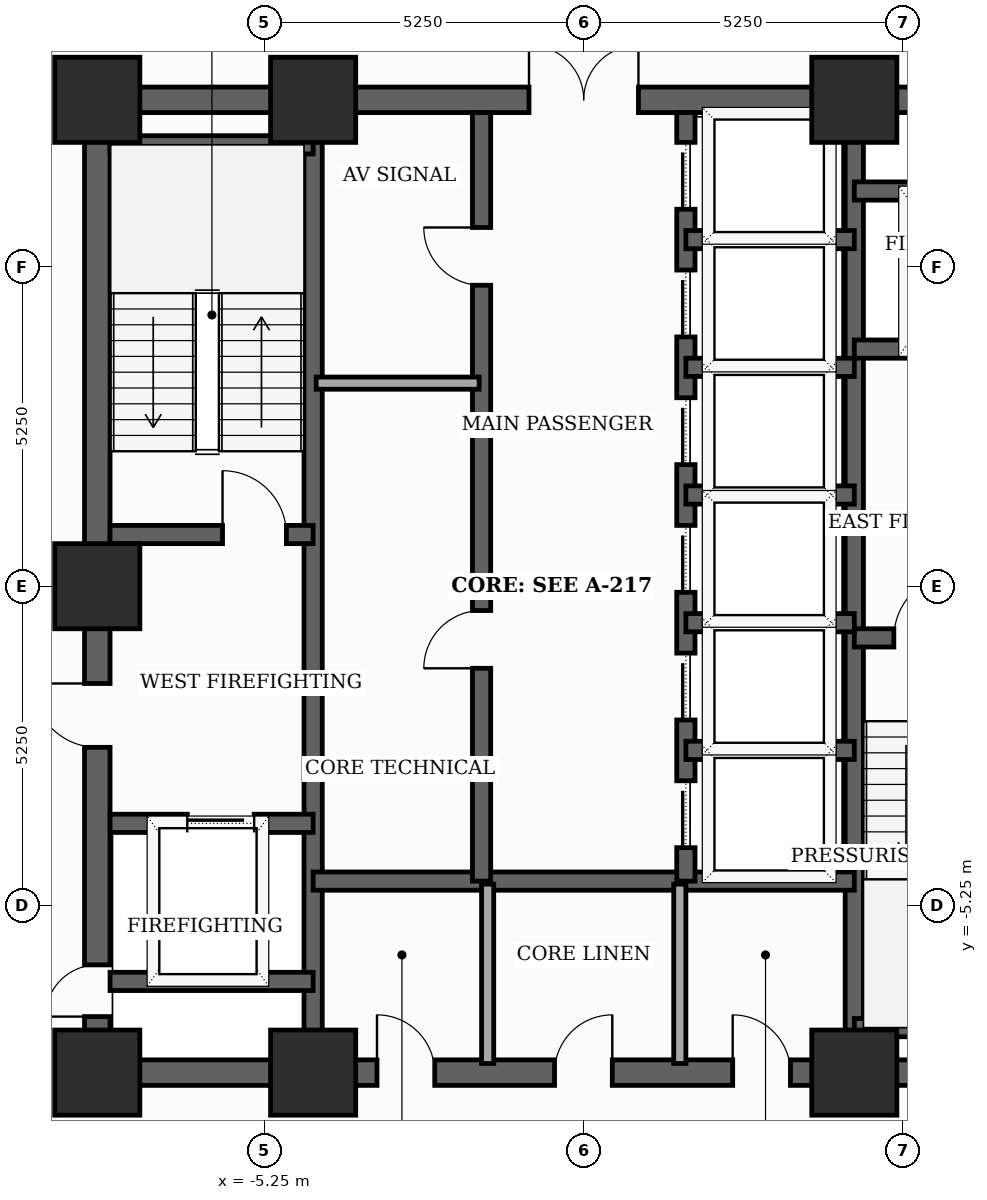
"""IFC4 building model, lengths in metres.
Left out: names, types, materials, properties, quantities, classifications, styles, units other than length and angle.
Written with IfcOpenShell. Run it as: python <this file> out.ifc"""

import sys

from ifc_helpers import new_model, si_unit, direction, frame, frame_2d, origin, origin_2d, place, context, subcontext, project, spatial, rectangle, extrude, element, fill, save


model = new_model("IFC4")
c1 = context("Model", 3, precision=1e-05, world=origin(), true_north=direction((0.0, 1.0)))
c2 = subcontext(c1, "Body", "Model", "MODEL_VIEW")
j1 = project(units=[si_unit("LENGTHUNIT", "METRE"), si_unit("PLANEANGLEUNIT", "RADIAN")], contexts=[c1])
p1 = place(None, origin())
s1 = spatial("IfcSite", under=j1, at=p1, CompositionType="ELEMENT")
p2 = place(p1, origin())
s2 = spatial("IfcBuilding", under=s1, at=p2, CompositionType="ELEMENT")
p3 = place(p2, frame((0.0, 0.0, 134.7)))
s3 = spatial("IfcBuildingStorey", under=s2, at=p3, CompositionType="ELEMENT", Elevation=134.7)
for number, where, z_axis, x_axis in (
    (1, (-8.0, -8.0, 0.0), (0.0, 0.0, 1.0), (1.0, 0.0, 0.0)),
    (2, (-4.45, -8.0, 0.0), (0.0, 0.0, 1.0), (1.0, 0.0, 0.0)),
    (3, (4.45, -8.0, 0.0), (0.0, 0.0, 1.0), (1.0, 0.0, 0.0)),
    (4, (4.45, 8.0, 0.0), (0.0, 0.0, 1.0), (1.0, 0.0, 0.0)),
    (5, (-4.45, 8.0, 0.0), (0.0, 0.0, 1.0), (1.0, 0.0, 0.0)),
    (6, (-8.0, 8.0, 0.0), (0.0, 0.0, 1.0), (1.0, 0.0, 0.0)),
    (7, (-8.0, 0.0, 0.0), (0.0, 0.0, 1.0), (1.0, 0.0, 0.0)),
):
    element("IfcColumn", number, at=place(p3, frame(where, z_axis=z_axis, x_axis=x_axis)), inside=s3, PredefinedType="COLUMN", context=c2, shape_type="SweptSolid", body=[
        extrude(rectangle(XDim=1.4, YDim=1.4, at=origin_2d()), origin(), (0.0, 0.0, 1.0), 3.7),
    ])
p4 = place(p3, frame((-8.0, -8.0, 0.0), z_axis=(0.0, 0.0, 1.0), x_axis=(0.0, 1.0, 0.0)))
e8 = element("IfcWall", 8, at=p4, inside=s3, PredefinedType="SHEAR", context=c2, shape_type="SweptSolid", body=[
    extrude(rectangle(XDim=16.0, YDim=0.42, at=frame_2d((8.0, 0.0))), origin(), (0.0, 0.0, 1.0), 3.5),
])
p5 = place(p4, frame((0.922, 0.0, 0.0)))
e9 = element("IfcOpeningElement", 9, at=p5, cuts=e8, PredefinedType="OPENING", context=c2, shape_type="SweptSolid", body=[
    extrude(rectangle(XDim=0.85, YDim=2.02, at=frame_2d((0.425, 1.01))), frame((0.0, 0.22, 0.0), z_axis=(0.0, -1.0, 0.0), x_axis=(1.0, 0.0, 0.0)), (0.0, 0.0, 1.0), 0.44),
])
p6 = place(p4, frame((5.35, 0.0, 0.0)))
e10 = element("IfcOpeningElement", 10, at=p6, cuts=e8, PredefinedType="OPENING", context=c2, shape_type="SweptSolid", body=[
    extrude(rectangle(XDim=1.05, YDim=2.15, at=frame_2d((0.525, 1.075))), frame((0.0, 0.22, 0.0), z_axis=(0.0, -1.0, 0.0), x_axis=(1.0, 0.0, 0.0)), (0.0, 0.0, 1.0), 0.44),
])
p7 = place(p3, frame((-8.0, -8.0, 0.0), z_axis=(0.0, 0.0, 1.0), x_axis=(1.0, 0.0, 0.0)))
e11 = element("IfcWall", 11, at=p7, inside=s3, PredefinedType="SHEAR", context=c2, shape_type="SweptSolid", body=[
    extrude(rectangle(XDim=16.0, YDim=0.42, at=frame_2d((8.0, 0.0))), origin(), (0.0, 0.0, 1.0), 3.5),
])
p8 = place(p7, frame((4.6, 0.0, 0.0)))
e12 = element("IfcOpeningElement", 12, at=p8, cuts=e11, PredefinedType="OPENING", context=c2, shape_type="SweptSolid", body=[
    extrude(rectangle(XDim=0.95, YDim=2.1, at=frame_2d((0.475, 1.05))), frame((0.0, 0.22, 0.0), z_axis=(0.0, -1.0, 0.0), x_axis=(1.0, 0.0, 0.0)), (0.0, 0.0, 1.0), 0.44),
])
p9 = place(p7, frame((7.52, 0.0, 0.0)))
e13 = element("IfcOpeningElement", 13, at=p9, cuts=e11, PredefinedType="OPENING", context=c2, shape_type="SweptSolid", body=[
    extrude(rectangle(XDim=0.95, YDim=2.1, at=frame_2d((0.475, 1.05))), frame((0.0, 0.22, 0.0), z_axis=(0.0, -1.0, 0.0), x_axis=(1.0, 0.0, 0.0)), (0.0, 0.0, 1.0), 0.44),
])
p10 = place(p7, frame((10.45, 0.0, 0.0)))
e14 = element("IfcOpeningElement", 14, at=p10, cuts=e11, PredefinedType="OPENING", context=c2, shape_type="SweptSolid", body=[
    extrude(rectangle(XDim=0.95, YDim=2.1, at=frame_2d((0.475, 1.05))), frame((0.0, 0.22, 0.0), z_axis=(0.0, -1.0, 0.0), x_axis=(1.0, 0.0, 0.0)), (0.0, 0.0, 1.0), 0.44),
])
p11 = place(p3, frame((-8.0, 8.0, 0.0), z_axis=(0.0, 0.0, 1.0), x_axis=(1.0, 0.0, 0.0)))
e15 = element("IfcWall", 15, at=p11, inside=s3, PredefinedType="SHEAR", context=c2, shape_type="SweptSolid", body=[
    extrude(rectangle(XDim=16.0, YDim=0.42, at=frame_2d((8.0, 0.0))), origin(), (0.0, 0.0, 1.0), 3.5),
])
p12 = place(p11, frame((7.1, 0.0, 0.0)))
e16 = element("IfcOpeningElement", 16, at=p12, cuts=e15, PredefinedType="OPENING", context=c2, shape_type="SweptSolid", body=[
    extrude(rectangle(XDim=1.8, YDim=2.15, at=frame_2d((0.9, 1.075))), frame((0.0, 0.22, 0.0), z_axis=(0.0, -1.0, 0.0), x_axis=(1.0, 0.0, 0.0)), (0.0, 0.0, 1.0), 0.44),
])
for number, where, z_axis, x_axis in (
    (17, (-4.45, -7.79, 0.0), (0.0, 0.0, 1.0), (0.0, 1.0, 0.0)),
    (18, (4.45, -7.79, 0.0), (0.0, 0.0, 1.0), (0.0, 1.0, 0.0)),
):
    element("IfcWall", number, at=place(p3, frame(where, z_axis=z_axis, x_axis=x_axis)), inside=s3, PredefinedType="SHEAR", context=c2, shape_type="SweptSolid", body=[
        extrude(rectangle(XDim=15.58, YDim=0.3, at=frame_2d((7.79, 0.0))), origin(), (0.0, 0.0, 1.0), 3.5),
    ])
p13 = place(p3, frame((-7.79, 0.85, 0.0), z_axis=(0.0, 0.0, 1.0), x_axis=(1.0, 0.0, 0.0)))
e19 = element("IfcWall", 19, at=p13, inside=s3, PredefinedType="SHEAR", context=c2, shape_type="SweptSolid", body=[
    extrude(rectangle(XDim=3.34, YDim=0.3, at=frame_2d((1.67, 0.0))), origin(), (0.0, 0.0, 1.0), 3.5),
])
p14 = place(p13, frame((1.85, 0.0, 0.0)))
e20 = element("IfcOpeningElement", 20, at=p14, cuts=e19, PredefinedType="OPENING", context=c2, shape_type="SweptSolid", body=[
    extrude(rectangle(XDim=1.05, YDim=2.15, at=frame_2d((0.525, 1.075))), frame((0.0, 0.16, 0.0), z_axis=(0.0, -1.0, 0.0), x_axis=(1.0, 0.0, 0.0)), (0.0, 0.0, 1.0), 0.32),
])
p15 = place(p3, frame((-7.79, 7.26, 0.0), z_axis=(0.0, 0.0, 1.0), x_axis=(1.0, 0.0, 0.0)))
e21 = element("IfcWall", 21, at=p15, inside=s3, PredefinedType="SHEAR", context=c2, shape_type="SweptSolid", body=[
    extrude(rectangle(XDim=3.34, YDim=0.3, at=frame_2d((1.67, 0.0))), origin(), (0.0, 0.0, 1.0), 3.5),
])
p16 = place(p3, frame((4.45, -0.85, 0.0), z_axis=(0.0, 0.0, 1.0), x_axis=(1.0, 0.0, 0.0)))
e22 = element("IfcWall", 22, at=p16, inside=s3, PredefinedType="SHEAR", context=c2, shape_type="SweptSolid", body=[
    extrude(rectangle(XDim=3.34, YDim=0.3, at=frame_2d((1.67, 0.0))), origin(), (0.0, 0.0, 1.0), 3.5),
])
p17 = place(p16, frame((0.65, 0.0, 0.0)))
e23 = element("IfcOpeningElement", 23, at=p17, cuts=e22, PredefinedType="OPENING", context=c2, shape_type="SweptSolid", body=[
    extrude(rectangle(XDim=1.05, YDim=2.15, at=frame_2d((0.525, 1.075))), frame((0.0, 0.16, 0.0), z_axis=(0.0, -1.0, 0.0), x_axis=(1.0, 0.0, 0.0)), (0.0, 0.0, 1.0), 0.32),
])
p18 = place(p3, frame((4.45, -7.26, 0.0), z_axis=(0.0, 0.0, 1.0), x_axis=(1.0, 0.0, 0.0)))
e24 = element("IfcWall", 24, at=p18, inside=s3, PredefinedType="SHEAR", context=c2, shape_type="SweptSolid", body=[
    extrude(rectangle(XDim=3.55, YDim=0.3, at=frame_2d((1.775, 0.0))), origin(), (0.0, 0.0, 1.0), 3.5),
])
p19 = place(p3, frame((-7.79, -3.9, 0.0), z_axis=(0.0, 0.0, 1.0), x_axis=(1.0, 0.0, 0.0)))
e25 = element("IfcWall", 25, at=p19, inside=s3, PredefinedType="SHEAR", context=c2, shape_type="SweptSolid", body=[
    extrude(rectangle(XDim=3.34, YDim=0.3, at=frame_2d((1.67, 0.0))), origin(), (0.0, 0.0, 1.0), 3.5),
])
p20 = place(p19, frame((1.27, 0.0, 0.0)))
e26 = element("IfcOpeningElement", 26, at=p20, cuts=e25, PredefinedType="OPENING", context=c2, shape_type="SweptSolid", body=[
    extrude(rectangle(XDim=1.1, YDim=2.1, at=frame_2d((0.55, 1.05))), frame((0.0, 0.16, 0.0), z_axis=(0.0, -1.0, 0.0), x_axis=(1.0, 0.0, 0.0)), (0.0, 0.0, 1.0), 0.32),
])
p21 = place(p3, frame((-7.79, -6.5, 0.0), z_axis=(0.0, 0.0, 1.0), x_axis=(1.0, 0.0, 0.0)))
e27 = element("IfcWall", 27, at=p21, inside=s3, PredefinedType="SHEAR", context=c2, shape_type="SweptSolid", body=[
    extrude(rectangle(XDim=3.34, YDim=0.3, at=frame_2d((1.67, 0.0))), origin(), (0.0, 0.0, 1.0), 3.5),
])
p22 = place(p3, frame((4.45, 3.9, 0.0), z_axis=(0.0, 0.0, 1.0), x_axis=(1.0, 0.0, 0.0)))
e28 = element("IfcWall", 28, at=p22, inside=s3, PredefinedType="SHEAR", context=c2, shape_type="SweptSolid", body=[
    extrude(rectangle(XDim=3.34, YDim=0.3, at=frame_2d((1.67, 0.0))), origin(), (0.0, 0.0, 1.0), 3.5),
])
p23 = place(p22, frame((1.18, 0.0, 0.0)))
e29 = element("IfcOpeningElement", 29, at=p23, cuts=e28, PredefinedType="OPENING", context=c2, shape_type="SweptSolid", body=[
    extrude(rectangle(XDim=1.1, YDim=2.1, at=frame_2d((0.55, 1.05))), frame((0.0, 0.16, 0.0), z_axis=(0.0, -1.0, 0.0), x_axis=(1.0, 0.0, 0.0)), (0.0, 0.0, 1.0), 0.32),
])
p24 = place(p3, frame((4.45, 6.5, 0.0), z_axis=(0.0, 0.0, 1.0), x_axis=(1.0, 0.0, 0.0)))
e30 = element("IfcWall", 30, at=p24, inside=s3, PredefinedType="SHEAR", context=c2, shape_type="SweptSolid", body=[
    extrude(rectangle(XDim=3.34, YDim=0.3, at=frame_2d((1.67, 0.0))), origin(), (0.0, 0.0, 1.0), 3.5),
])
p25 = place(p3, frame((-4.45, -4.85, 0.0), z_axis=(0.0, 0.0, 1.0), x_axis=(1.0, 0.0, 0.0)))
e31 = element("IfcWall", 31, at=p25, inside=s3, PredefinedType="SHEAR", context=c2, shape_type="SweptSolid", body=[
    extrude(rectangle(XDim=8.9, YDim=0.3, at=frame_2d((4.45, 0.0))), origin(), (0.0, 0.0, 1.0), 3.5),
])
p26 = place(p3, frame((-1.68, -4.85, 0.0), z_axis=(0.0, 0.0, 1.0), x_axis=(0.0, 1.0, 0.0)))
e32 = element("IfcWall", 32, at=p26, inside=s3, PredefinedType="SHEAR", context=c2, shape_type="SweptSolid", body=[
    extrude(rectangle(XDim=12.64, YDim=0.3, at=frame_2d((6.32, 0.0))), origin(), (0.0, 0.0, 1.0), 3.5),
])
p27 = place(p26, frame((3.5, 0.0, 0.0)))
e33 = element("IfcOpeningElement", 33, at=p27, cuts=e32, PredefinedType="OPENING", context=c2, shape_type="SweptSolid", body=[
    extrude(rectangle(XDim=0.95, YDim=2.1, at=frame_2d((0.475, 1.05))), frame((0.0, 0.16, 0.0), z_axis=(0.0, -1.0, 0.0), x_axis=(1.0, 0.0, 0.0)), (0.0, 0.0, 1.0), 0.32),
])
p28 = place(p26, frame((9.8, 0.0, 0.0)))
e34 = element("IfcOpeningElement", 34, at=p28, cuts=e32, PredefinedType="OPENING", context=c2, shape_type="SweptSolid", body=[
    extrude(rectangle(XDim=0.95, YDim=2.1, at=frame_2d((0.475, 1.05))), frame((0.0, 0.16, 0.0), z_axis=(0.0, -1.0, 0.0), x_axis=(1.0, 0.0, 0.0)), (0.0, 0.0, 1.0), 0.32),
])
p29 = place(p3, frame((1.68, -4.85, 0.0), z_axis=(0.0, 0.0, 1.0), x_axis=(0.0, 1.0, 0.0)))
e35 = element("IfcWall", 35, at=p29, inside=s3, PredefinedType="SHEAR", context=c2, shape_type="SweptSolid", body=[
    extrude(rectangle(XDim=12.64, YDim=0.3, at=frame_2d((6.32, 0.0))), origin(), (0.0, 0.0, 1.0), 3.5),
])
p30 = place(p29, frame((0.55, 0.0, 0.0)))
e36 = element("IfcOpeningElement", 36, at=p30, cuts=e35, PredefinedType="OPENING", context=c2, shape_type="SweptSolid", body=[
    extrude(rectangle(XDim=1.1, YDim=2.1, at=frame_2d((0.55, 1.05))), frame((0.0, 0.16, 0.0), z_axis=(0.0, -1.0, 0.0), x_axis=(1.0, 0.0, 0.0)), (0.0, 0.0, 1.0), 0.32),
])
p31 = place(p29, frame((2.65, 0.0, 0.0)))
e37 = element("IfcOpeningElement", 37, at=p31, cuts=e35, PredefinedType="OPENING", context=c2, shape_type="SweptSolid", body=[
    extrude(rectangle(XDim=1.1, YDim=2.1, at=frame_2d((0.55, 1.05))), frame((0.0, 0.16, 0.0), z_axis=(0.0, -1.0, 0.0), x_axis=(1.0, 0.0, 0.0)), (0.0, 0.0, 1.0), 0.32),
])
p32 = place(p29, frame((4.75, 0.0, 0.0)))
e38 = element("IfcOpeningElement", 38, at=p32, cuts=e35, PredefinedType="OPENING", context=c2, shape_type="SweptSolid", body=[
    extrude(rectangle(XDim=1.1, YDim=2.1, at=frame_2d((0.55, 1.05))), frame((0.0, 0.16, 0.0), z_axis=(0.0, -1.0, 0.0), x_axis=(1.0, 0.0, 0.0)), (0.0, 0.0, 1.0), 0.32),
])
p33 = place(p29, frame((6.85, 0.0, 0.0)))
e39 = element("IfcOpeningElement", 39, at=p33, cuts=e35, PredefinedType="OPENING", context=c2, shape_type="SweptSolid", body=[
    extrude(rectangle(XDim=1.1, YDim=2.1, at=frame_2d((0.55, 1.05))), frame((0.0, 0.16, 0.0), z_axis=(0.0, -1.0, 0.0), x_axis=(1.0, 0.0, 0.0)), (0.0, 0.0, 1.0), 0.32),
])
p34 = place(p29, frame((8.95, 0.0, 0.0)))
e40 = element("IfcOpeningElement", 40, at=p34, cuts=e35, PredefinedType="OPENING", context=c2, shape_type="SweptSolid", body=[
    extrude(rectangle(XDim=1.1, YDim=2.1, at=frame_2d((0.55, 1.05))), frame((0.0, 0.16, 0.0), z_axis=(0.0, -1.0, 0.0), x_axis=(1.0, 0.0, 0.0)), (0.0, 0.0, 1.0), 0.32),
])
p35 = place(p29, frame((11.05, 0.0, 0.0)))
e41 = element("IfcOpeningElement", 41, at=p35, cuts=e35, PredefinedType="OPENING", context=c2, shape_type="SweptSolid", body=[
    extrude(rectangle(XDim=1.1, YDim=2.1, at=frame_2d((0.55, 1.05))), frame((0.0, 0.16, 0.0), z_axis=(0.0, -1.0, 0.0), x_axis=(1.0, 0.0, 0.0)), (0.0, 0.0, 1.0), 0.32),
])
for number, where, z_axis, x_axis in (
    (42, (1.68, 1.5, 0.0), (0.0, 0.0, 1.0), (1.0, 0.0, 0.0)),
    (43, (1.68, 3.6, 0.0), (0.0, 0.0, 1.0), (1.0, 0.0, 0.0)),
    (44, (1.68, 5.7, 0.0), (0.0, 0.0, 1.0), (1.0, 0.0, 0.0)),
    (45, (1.68, -2.7, 0.0), (0.0, 0.0, 1.0), (1.0, 0.0, 0.0)),
    (46, (1.68, -0.6, 0.0), (0.0, 0.0, 1.0), (1.0, 0.0, 0.0)),
):
    element("IfcWall", number, at=place(p3, frame(where, z_axis=z_axis, x_axis=x_axis)), inside=s3, PredefinedType="SHEAR", context=c2, shape_type="SweptSolid", body=[
        extrude(rectangle(XDim=2.77, YDim=0.3, at=frame_2d((1.385, 0.0))), origin(), (0.0, 0.0, 1.0), 3.5),
    ])
for number, where, z_axis, x_axis in (
    (47, (-1.58, -7.85, 0.0), (0.0, 0.0, 1.0), (0.0, 1.0, 0.0)),
    (48, (1.58, -7.85, 0.0), (0.0, 0.0, 1.0), (0.0, 1.0, 0.0)),
):
    element("IfcWall", number, at=place(p3, frame(where, z_axis=z_axis, x_axis=x_axis)), inside=s3, PredefinedType="SOLIDWALL", context=c2, shape_type="SweptSolid", body=[
        extrude(rectangle(XDim=2.95, YDim=0.2, at=frame_2d((1.475, 0.0))), origin(), (0.0, 0.0, 1.0), 2.885),
    ])
p36 = place(p3, frame((-4.4, 3.34, 0.0), z_axis=(0.0, 0.0, 1.0), x_axis=(1.0, 0.0, 0.0)))
e49 = element("IfcWall", 49, at=p36, inside=s3, PredefinedType="SOLIDWALL", context=c2, shape_type="SweptSolid", body=[
    extrude(rectangle(XDim=2.68, YDim=0.2, at=frame_2d((1.34, 0.0))), origin(), (0.0, 0.0, 1.0), 3.5),
])
p37 = place(p5, origin())
e50 = element("IfcDoor", 50, at=p37, inside=s3, OperationType="SINGLE_SWING_LEFT", PredefinedType="TRAPDOOR", context=c2, shape_type="SweptSolid", body=[
    extrude(rectangle(XDim=0.85, YDim=2.02, at=frame_2d((0.425, 1.01))), frame((0.0, 0.025, 0.0), z_axis=(0.0, -1.0, 0.0), x_axis=(1.0, 0.0, 0.0)), (0.0, 0.0, 1.0), 0.05),
])
fill(e9, e50)
p38 = place(p6, origin())
e51 = element("IfcDoor", 51, at=p38, inside=s3, OperationType="SINGLE_SWING_RIGHT", PredefinedType="DOOR", context=c2, shape_type="SweptSolid", body=[
    extrude(rectangle(XDim=1.05, YDim=2.15, at=frame_2d((0.525, 1.075))), frame((0.0, 0.025, 0.0), z_axis=(0.0, -1.0, 0.0), x_axis=(1.0, 0.0, 0.0)), (0.0, 0.0, 1.0), 0.05),
])
fill(e10, e51)
p39 = place(p8, origin())
e52 = element("IfcDoor", 52, at=p39, inside=s3, OperationType="SINGLE_SWING_LEFT", PredefinedType="DOOR", context=c2, shape_type="SweptSolid", body=[
    extrude(rectangle(XDim=0.95, YDim=2.1, at=frame_2d((0.475, 1.05))), frame((0.0, 0.025, 0.0), z_axis=(0.0, -1.0, 0.0), x_axis=(1.0, 0.0, 0.0)), (0.0, 0.0, 1.0), 0.05),
])
fill(e12, e52)
p40 = place(p9, origin())
e53 = element("IfcDoor", 53, at=p40, inside=s3, OperationType="SINGLE_SWING_RIGHT", PredefinedType="DOOR", context=c2, shape_type="SweptSolid", body=[
    extrude(rectangle(XDim=0.95, YDim=2.1, at=frame_2d((0.475, 1.05))), frame((0.0, 0.025, 0.0), z_axis=(0.0, -1.0, 0.0), x_axis=(1.0, 0.0, 0.0)), (0.0, 0.0, 1.0), 0.05),
])
fill(e13, e53)
p41 = place(p10, origin())
e54 = element("IfcDoor", 54, at=p41, inside=s3, OperationType="SINGLE_SWING_LEFT", PredefinedType="DOOR", context=c2, shape_type="SweptSolid", body=[
    extrude(rectangle(XDim=0.95, YDim=2.1, at=frame_2d((0.475, 1.05))), frame((0.0, 0.025, 0.0), z_axis=(0.0, -1.0, 0.0), x_axis=(1.0, 0.0, 0.0)), (0.0, 0.0, 1.0), 0.05),
])
fill(e14, e54)
p42 = place(p12, origin())
e55 = element("IfcDoor", 55, at=p42, inside=s3, OperationType="DOUBLE_DOOR_SINGLE_SWING", PredefinedType="DOOR", context=c2, shape_type="SweptSolid", body=[
    extrude(rectangle(XDim=1.8, YDim=2.15, at=frame_2d((0.9, 1.075))), frame((0.0, 0.025, 0.0), z_axis=(0.0, -1.0, 0.0), x_axis=(1.0, 0.0, 0.0)), (0.0, 0.0, 1.0), 0.05),
])
fill(e16, e55)
p43 = place(p14, origin())
e56 = element("IfcDoor", 56, at=p43, inside=s3, OperationType="SINGLE_SWING_LEFT", PredefinedType="DOOR", context=c2, shape_type="SweptSolid", body=[
    extrude(rectangle(XDim=1.05, YDim=2.15, at=frame_2d((0.525, 1.075))), frame((0.0, 0.025, 0.0), z_axis=(0.0, -1.0, 0.0), x_axis=(1.0, 0.0, 0.0)), (0.0, 0.0, 1.0), 0.05),
])
fill(e20, e56)
p44 = place(p17, origin())
e57 = element("IfcDoor", 57, at=p44, inside=s3, OperationType="SINGLE_SWING_RIGHT", PredefinedType="DOOR", context=c2, shape_type="SweptSolid", body=[
    extrude(rectangle(XDim=1.05, YDim=2.15, at=frame_2d((0.525, 1.075))), frame((0.0, 0.025, 0.0), z_axis=(0.0, -1.0, 0.0), x_axis=(1.0, 0.0, 0.0)), (0.0, 0.0, 1.0), 0.05),
])
fill(e23, e57)
p45 = place(p20, origin())
e58 = element("IfcDoor", 58, at=p45, inside=s3, OperationType="SLIDING_TO_LEFT", PredefinedType="DOOR", context=c2, shape_type="SweptSolid", body=[
    extrude(rectangle(XDim=1.1, YDim=2.1, at=frame_2d((0.55, 1.05))), frame((0.0, 0.025, 0.0), z_axis=(0.0, -1.0, 0.0), x_axis=(1.0, 0.0, 0.0)), (0.0, 0.0, 1.0), 0.05),
])
fill(e26, e58)
p46 = place(p27, origin())
e59 = element("IfcDoor", 59, at=p46, inside=s3, OperationType="SINGLE_SWING_LEFT", PredefinedType="DOOR", context=c2, shape_type="SweptSolid", body=[
    extrude(rectangle(XDim=0.95, YDim=2.1, at=frame_2d((0.475, 1.05))), frame((0.0, 0.025, 0.0), z_axis=(0.0, -1.0, 0.0), x_axis=(1.0, 0.0, 0.0)), (0.0, 0.0, 1.0), 0.05),
])
fill(e33, e59)
p47 = place(p28, origin())
e60 = element("IfcDoor", 60, at=p47, inside=s3, OperationType="SINGLE_SWING_RIGHT", PredefinedType="DOOR", context=c2, shape_type="SweptSolid", body=[
    extrude(rectangle(XDim=0.95, YDim=2.1, at=frame_2d((0.475, 1.05))), frame((0.0, 0.025, 0.0), z_axis=(0.0, -1.0, 0.0), x_axis=(1.0, 0.0, 0.0)), (0.0, 0.0, 1.0), 0.05),
])
fill(e34, e60)
p48 = place(p30, origin())
e61 = element("IfcDoor", 61, at=p48, inside=s3, OperationType="SLIDING_TO_LEFT", PredefinedType="DOOR", context=c2, shape_type="SweptSolid", body=[
    extrude(rectangle(XDim=1.1, YDim=2.1, at=frame_2d((0.55, 1.05))), frame((0.0, 0.025, 0.0), z_axis=(0.0, -1.0, 0.0), x_axis=(1.0, 0.0, 0.0)), (0.0, 0.0, 1.0), 0.05),
])
fill(e36, e61)
p49 = place(p31, origin())
e62 = element("IfcDoor", 62, at=p49, inside=s3, OperationType="SLIDING_TO_LEFT", PredefinedType="DOOR", context=c2, shape_type="SweptSolid", body=[
    extrude(rectangle(XDim=1.1, YDim=2.1, at=frame_2d((0.55, 1.05))), frame((0.0, 0.025, 0.0), z_axis=(0.0, -1.0, 0.0), x_axis=(1.0, 0.0, 0.0)), (0.0, 0.0, 1.0), 0.05),
])
fill(e37, e62)
p50 = place(p32, origin())
e63 = element("IfcDoor", 63, at=p50, inside=s3, OperationType="SLIDING_TO_LEFT", PredefinedType="DOOR", context=c2, shape_type="SweptSolid", body=[
    extrude(rectangle(XDim=1.1, YDim=2.1, at=frame_2d((0.55, 1.05))), frame((0.0, 0.025, 0.0), z_axis=(0.0, -1.0, 0.0), x_axis=(1.0, 0.0, 0.0)), (0.0, 0.0, 1.0), 0.05),
])
fill(e38, e63)
p51 = place(p33, origin())
e64 = element("IfcDoor", 64, at=p51, inside=s3, OperationType="SLIDING_TO_LEFT", PredefinedType="DOOR", context=c2, shape_type="SweptSolid", body=[
    extrude(rectangle(XDim=1.1, YDim=2.1, at=frame_2d((0.55, 1.05))), frame((0.0, 0.025, 0.0), z_axis=(0.0, -1.0, 0.0), x_axis=(1.0, 0.0, 0.0)), (0.0, 0.0, 1.0), 0.05),
])
fill(e39, e64)
p52 = place(p34, origin())
e65 = element("IfcDoor", 65, at=p52, inside=s3, OperationType="SLIDING_TO_LEFT", PredefinedType="DOOR", context=c2, shape_type="SweptSolid", body=[
    extrude(rectangle(XDim=1.1, YDim=2.1, at=frame_2d((0.55, 1.05))), frame((0.0, 0.025, 0.0), z_axis=(0.0, -1.0, 0.0), x_axis=(1.0, 0.0, 0.0)), (0.0, 0.0, 1.0), 0.05),
])
fill(e40, e65)
p53 = place(p35, origin())
e66 = element("IfcDoor", 66, at=p53, inside=s3, OperationType="SLIDING_TO_LEFT", PredefinedType="DOOR", context=c2, shape_type="SweptSolid", body=[
    extrude(rectangle(XDim=1.1, YDim=2.1, at=frame_2d((0.55, 1.05))), frame((0.0, 0.025, 0.0), z_axis=(0.0, -1.0, 0.0), x_axis=(1.0, 0.0, 0.0)), (0.0, 0.0, 1.0), 0.05),
])
fill(e41, e66)
save(model, sys.argv[1])
